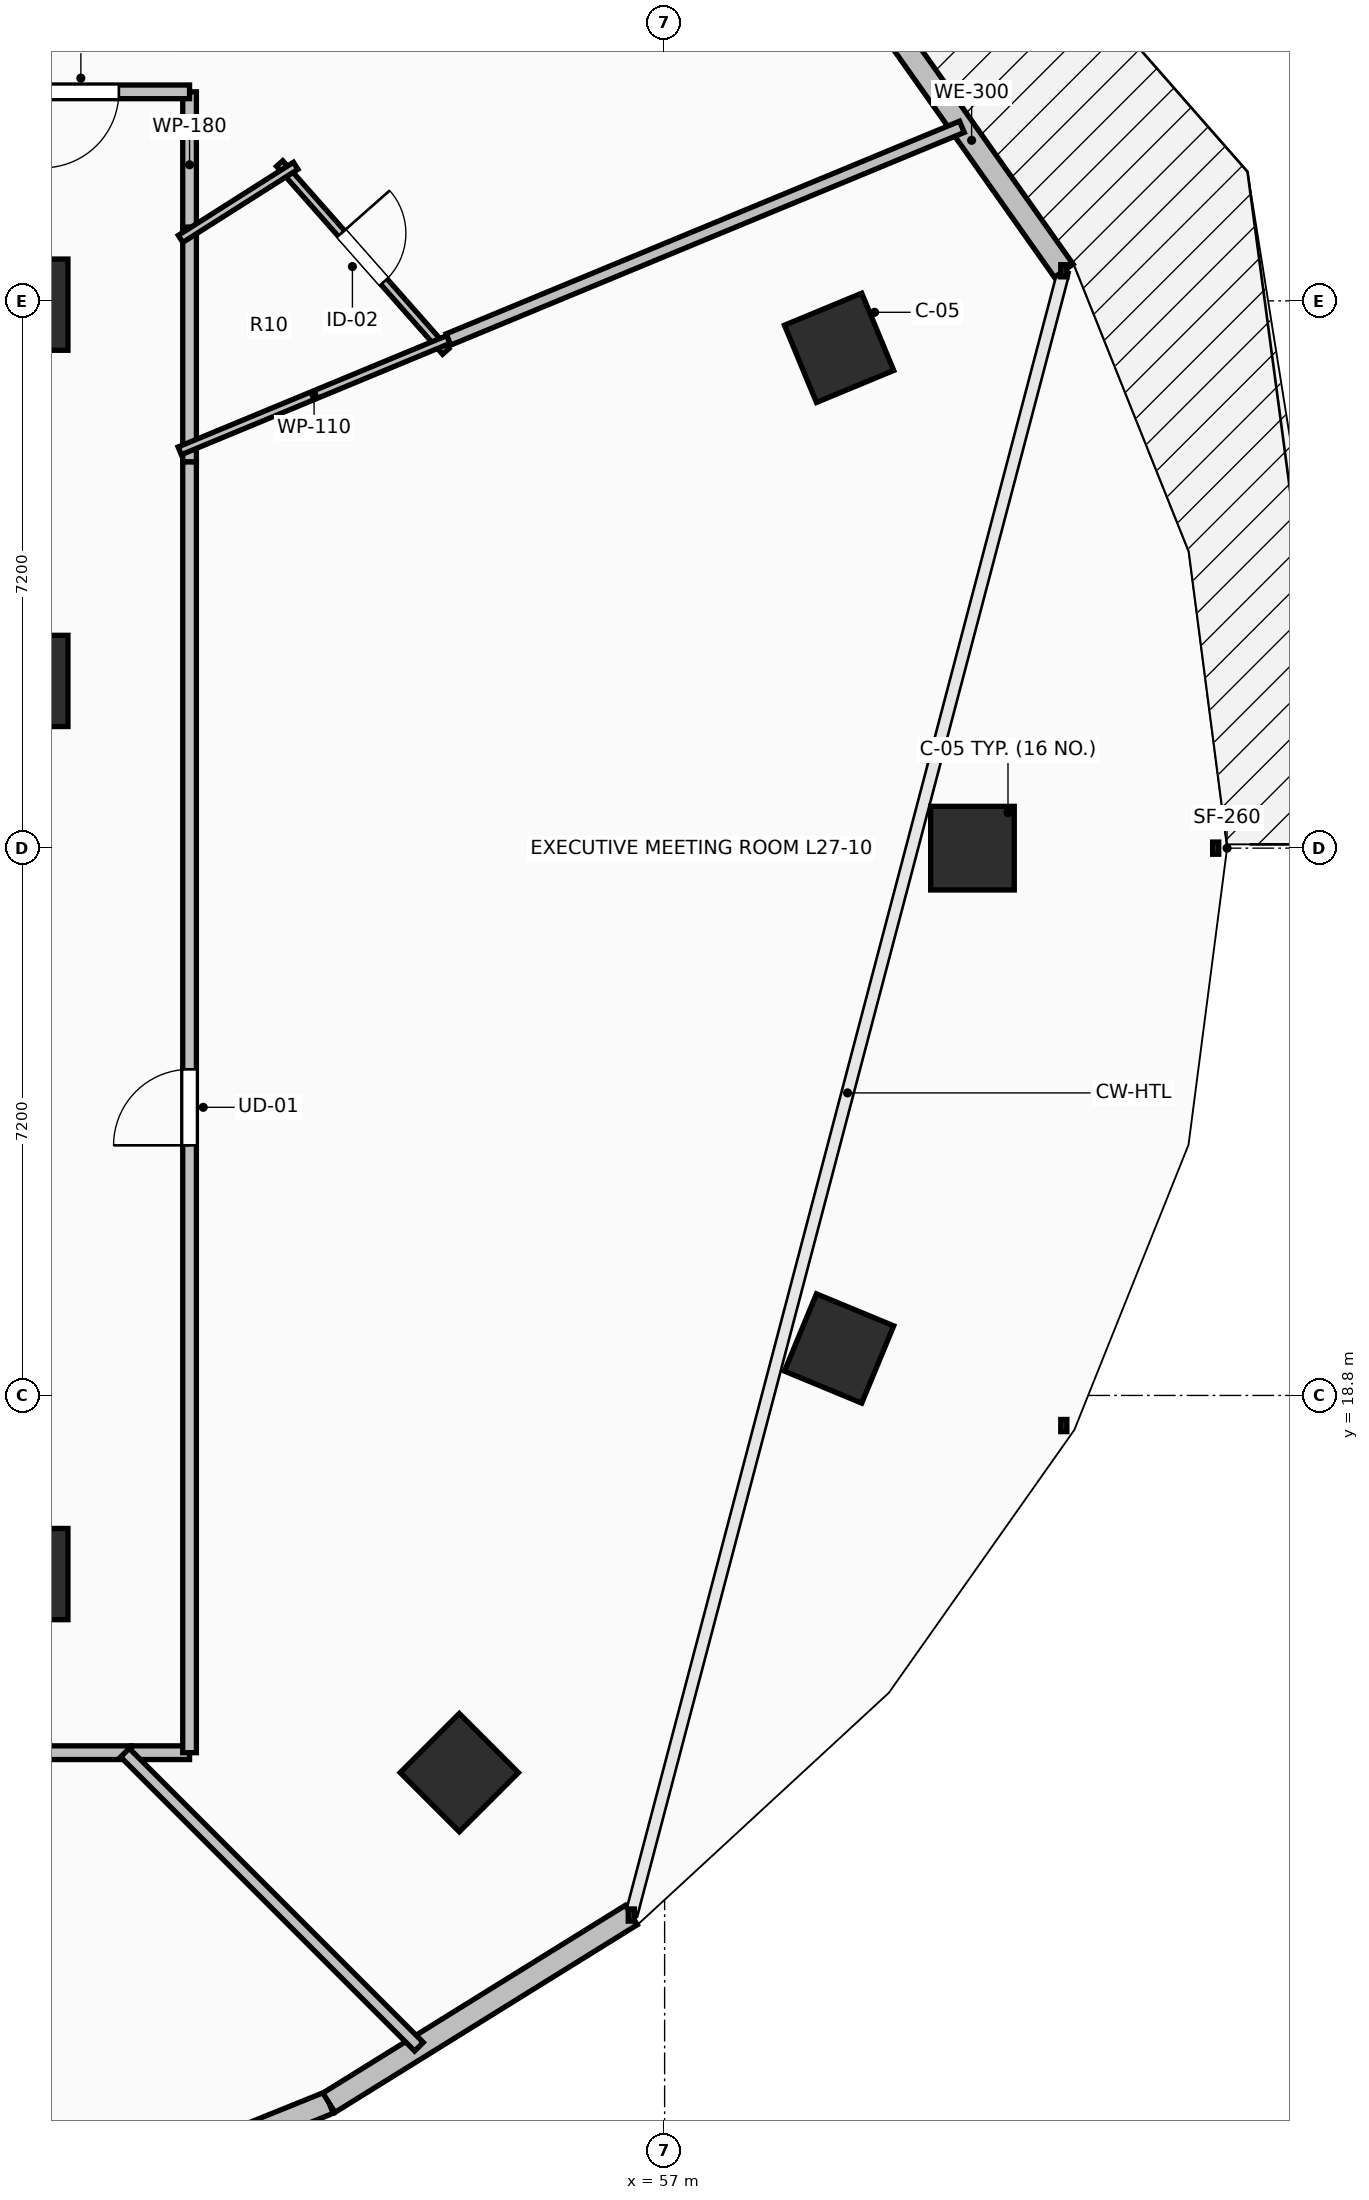
"""IFC4 building model, lengths in metres.
Left out: names, types, materials, properties, quantities, classifications, styles, units other than length and angle.
Written with IfcOpenShell. Run it as: python <this file> out.ifc"""

import sys

from ifc_helpers import new_model, si_unit, direction, frame, frame_2d, origin, origin_2d, place, context, subcontext, project, spatial, rectangle, extrude, element, fill, save


model = new_model("IFC4")
c1 = context("Model", 3, precision=1e-05, world=origin(), true_north=direction((0.0, 1.0)))
c2 = subcontext(c1, "Body", "Model", "MODEL_VIEW")
j1 = project(units=[si_unit("LENGTHUNIT", "METRE"), si_unit("PLANEANGLEUNIT", "RADIAN")], contexts=[c1])
p1 = place(None, origin())
s1 = spatial("IfcSite", under=j1, at=p1, CompositionType="ELEMENT")
p2 = place(p1, origin())
s2 = spatial("IfcBuilding", under=s1, at=p2, CompositionType="ELEMENT")
p3 = place(p2, frame((0.0, 0.0, 103.3)))
s3 = spatial("IfcBuildingStorey", under=s2, at=p3, CompositionType="ELEMENT", Elevation=103.3)
for number, where, z_axis, x_axis in (
    (1, (61.05, 26.0, 0.0), (0.0, 0.0, 1.0), (1.0, 0.0, 0.0)),
    (2, (59.295, 32.582, 0.0), (0.0, 0.0, 1.0), (0.924, 0.383, 0.0)),
    (3, (54.299, 13.838, 0.0), (0.0, 0.0, 1.0), (0.707, -0.707, 0.0)),
    (4, (59.295, 19.418, 0.0), (0.0, 0.0, 1.0), (0.924, -0.383, 0.0)),
):
    element("IfcColumn", number, at=place(p3, frame(where, z_axis=z_axis, x_axis=x_axis)), inside=s3, PredefinedType="COLUMN", context=c2, shape_type="SweptSolid", body=[
        extrude(rectangle(XDim=1.1, YDim=1.1, at=origin_2d()), origin(), (0.0, 0.0, 1.0), 3.5),
    ])
for number, where, z_axis, x_axis in (
    (5, (48.75, 33.15, 0.0), (0.0, 0.0, 1.0), (1.0, 0.0, 0.0)),
    (6, (48.75, 28.2, 0.0), (0.0, 0.0, 1.0), (1.0, 0.0, 0.0)),
    (7, (48.75, 16.45, 0.0), (0.0, 0.0, 1.0), (1.0, 0.0, 0.0)),
):
    element("IfcColumn", number, at=place(p3, frame(where, z_axis=z_axis, x_axis=x_axis)), inside=s3, PredefinedType="PILASTER", context=c2, shape_type="SweptSolid", body=[
        extrude(rectangle(XDim=0.8, YDim=1.2, at=origin_2d()), origin(), (0.0, 0.0, 1.0), 3.5),
    ])
p4 = place(p3, frame((62.252, 33.596, 0.0), z_axis=(0.0, 0.0, 1.0), x_axis=(-0.57716435238, 0.81662801222, 0.0)))
e8 = element("IfcWall", 8, at=p4, inside=s3, PredefinedType="STANDARD", context=c2, shape_type="SweptSolid", body=[
    extrude(rectangle(XDim=4.202, YDim=0.3, at=frame_2d((2.101, 0.0))), origin(), (0.0, 0.0, 1.0), 3.24),
])
p5 = place(p3, frame((48.045, 7.661, 0.0), z_axis=(0.0, 0.0, 1.0), x_axis=(0.927122233109, 0.374759075775, 0.0)))
e9 = element("IfcWall", 9, at=p5, inside=s3, PredefinedType="STANDARD", context=c2, shape_type="SweptSolid", body=[
    extrude(rectangle(XDim=4.895, YDim=0.3, at=frame_2d((2.448, 0.0))), origin(), (0.0, 0.0, 1.0), 3.24),
])
p6 = place(p3, frame((52.584, 9.495, 0.0), z_axis=(0.0, 0.0, 1.0), x_axis=(0.849684479743, 0.527291461038, 0.0)))
e10 = element("IfcWall", 10, at=p6, inside=s3, PredefinedType="STANDARD", context=c2, shape_type="SweptSolid", body=[
    extrude(rectangle(XDim=4.681, YDim=0.3, at=frame_2d((2.341, 0.0))), origin(), (0.0, 0.0, 1.0), 3.24),
])
p7 = place(p3, frame((50.75, 34.031, 0.0), z_axis=(0.0, 0.0, 1.0), x_axis=(0.0, 1.0, 0.0)))
e11 = element("IfcWall", 11, at=p7, inside=s3, PredefinedType="PARTITIONING", context=c2, shape_type="SweptSolid", body=[
    extrude(rectangle(XDim=1.919, YDim=0.18, at=frame_2d((0.959, 0.0))), origin(), (0.0, 0.0, 1.0), 2.432),
])
p8 = place(p3, frame((50.75, 35.95, 0.0), z_axis=(0.0, 0.0, 1.0), x_axis=(-1.0, 0.0, 0.0)))
e12 = element("IfcWall", 12, at=p8, inside=s3, PredefinedType="PARTITIONING", context=c2, shape_type="SweptSolid", body=[
    extrude(rectangle(XDim=2.86, YDim=0.18, at=frame_2d((1.43, 0.0))), origin(), (0.0, 0.0, 1.0), 2.432),
])
p9 = place(p8, frame((0.93, 0.0, 0.0)))
e13 = element("IfcOpeningElement", 13, at=p9, cuts=e12, PredefinedType="OPENING", context=c2, shape_type="SweptSolid", body=[
    extrude(rectangle(XDim=1.0, YDim=2.15, at=frame_2d((0.5, 1.075))), frame((0.0, 0.105, 0.0), z_axis=(0.0, -1.0, 0.0), x_axis=(1.0, 0.0, 0.0)), (0.0, 0.0, 1.0), 0.21),
])
p10 = place(p3, frame((50.75, 31.081, 0.0), z_axis=(0.0, 0.0, 1.0), x_axis=(0.0, 1.0, 0.0)))
e14 = element("IfcWall", 14, at=p10, inside=s3, PredefinedType="PARTITIONING", context=c2, shape_type="SweptSolid", body=[
    extrude(rectangle(XDim=3.09, YDim=0.18, at=frame_2d((1.545, 0.0))), origin(), (0.0, 0.0, 1.0), 2.432),
])
p11 = place(p3, frame((42.34, 14.1, 0.0), z_axis=(0.0, 0.0, 1.0), x_axis=(1.0, 0.0, 0.0)))
e15 = element("IfcWall", 15, at=p11, inside=s3, PredefinedType="PARTITIONING", context=c2, shape_type="SweptSolid", body=[
    extrude(rectangle(XDim=7.645, YDim=0.18, at=frame_2d((3.823, 0.0))), origin(), (0.0, 0.0, 1.0), 2.432),
])
p12 = place(p3, frame((49.985, 14.1, 0.0), z_axis=(0.0, 0.0, 1.0), x_axis=(1.0, 0.0, 0.0)))
e16 = element("IfcWall", 16, at=p12, inside=s3, PredefinedType="PARTITIONING", context=c2, shape_type="SweptSolid", body=[
    extrude(rectangle(XDim=0.765, YDim=0.18, at=frame_2d((0.382, 0.0))), origin(), (0.0, 0.0, 1.0), 2.972),
])
p13 = place(p3, frame((50.75, 14.1, 0.0), z_axis=(0.0, 0.0, 1.0), x_axis=(0.0, 1.0, 0.0)))
e17 = element("IfcWall", 17, at=p13, inside=s3, PredefinedType="PARTITIONING", context=c2, shape_type="SweptSolid", body=[
    extrude(rectangle(XDim=16.981, YDim=0.18, at=frame_2d((8.49, 0.0))), origin(), (0.0, 0.0, 1.0), 2.432),
])
p14 = place(p13, frame((7.99, 0.0, 0.0)))
e18 = element("IfcOpeningElement", 18, at=p14, cuts=e17, PredefinedType="OPENING", context=c2, shape_type="SweptSolid", body=[
    extrude(rectangle(XDim=1.0, YDim=2.15, at=frame_2d((0.5, 1.075))), frame((0.0, 0.105, 0.0), z_axis=(0.0, -1.0, 0.0), x_axis=(1.0, 0.0, 0.0)), (0.0, 0.0, 1.0), 0.21),
])
p15 = place(p3, frame((51.935, 35.007, 0.0), z_axis=(0.0, 0.0, 1.0), x_axis=(0.662059609276, -0.749451181709, 0.0)))
e19 = element("IfcWall", 19, at=p15, inside=s3, PredefinedType="PARTITIONING", context=c2, shape_type="SweptSolid", body=[
    extrude(rectangle(XDim=3.299, YDim=0.11, at=frame_2d((1.65, 0.0))), origin(), (0.0, 0.0, 1.0), 2.432),
])
p16 = place(p15, frame((1.225, 0.0, 0.0)))
e20 = element("IfcOpeningElement", 20, at=p16, cuts=e19, PredefinedType="OPENING", context=c2, shape_type="SweptSolid", body=[
    extrude(rectangle(XDim=0.85, YDim=2.1, at=frame_2d((0.425, 1.05))), frame((0.0, 0.07, 0.0), z_axis=(0.0, -1.0, 0.0), x_axis=(1.0, 0.0, 0.0)), (0.0, 0.0, 1.0), 0.14),
])
p17 = place(p3, frame((54.156, 32.693, 0.0), z_axis=(0.0, 0.0, 1.0), x_axis=(-0.923803754276, -0.382866326002, 0.0)))
e21 = element("IfcWall", 21, at=p17, inside=s3, PredefinedType="PARTITIONING", context=c2, shape_type="SweptSolid", body=[
    extrude(rectangle(XDim=3.827, YDim=0.11, at=frame_2d((1.914, 0.0))), origin(), (0.0, 0.0, 1.0), 2.432),
])
p18 = place(p3, frame((50.632, 34.016, 0.0), z_axis=(0.0, 0.0, 1.0), x_axis=(0.844361394482, 0.535774052665, 0.0)))
e22 = element("IfcWall", 22, at=p18, inside=s3, PredefinedType="PARTITIONING", context=c2, shape_type="SweptSolid", body=[
    extrude(rectangle(XDim=1.793, YDim=0.11, at=frame_2d((0.897, 0.0))), origin(), (0.0, 0.0, 1.0), 2.886),
])
p19 = place(p3, frame((49.053, 37.053, 0.0), z_axis=(0.0, 0.0, 1.0), x_axis=(-0.707106781187, -0.707106781187, 0.0)))
e23 = element("IfcWall", 23, at=p19, inside=s3, PredefinedType="PARTITIONING", context=c2, shape_type="SweptSolid", body=[
    extrude(rectangle(XDim=1.7, YDim=0.16, at=frame_2d((0.85, 0.0))), origin(), (0.0, 0.0, 1.0), 2.432),
])
p20 = place(p3, frame((54.156, 32.692, 0.0), z_axis=(0.0, 0.0, 1.0), x_axis=(0.923875192571, 0.38269390974, 0.0)))
e24 = element("IfcWall", 24, at=p20, inside=s3, PredefinedType="PARTITIONING", context=c2, shape_type="SweptSolid", body=[
    extrude(rectangle(XDim=7.311, YDim=0.16, at=frame_2d((3.656, 0.0))), origin(), (0.0, 0.0, 1.0), 2.432),
])
p21 = place(p3, frame((53.768, 10.232, 0.0), z_axis=(0.0, 0.0, 1.0), x_axis=(-0.707106781187, 0.707106781187, 0.0)))
e25 = element("IfcWall", 25, at=p21, inside=s3, PredefinedType="PARTITIONING", context=c2, shape_type="SweptSolid", body=[
    extrude(rectangle(XDim=5.47, YDim=0.16, at=frame_2d((2.735, 0.0))), origin(), (0.0, 0.0, 1.0), 2.677),
])
p22 = place(p9, origin())
e26 = element("IfcDoor", 26, at=p22, inside=s3, OperationType="SINGLE_SWING_RIGHT", PredefinedType="DOOR", context=c2, shape_type="SweptSolid", body=[
    extrude(rectangle(XDim=1.0, YDim=2.15, at=frame_2d((0.5, 1.075))), frame((0.0, 0.025, 0.0), z_axis=(0.0, -1.0, 0.0), x_axis=(1.0, 0.0, 0.0)), (0.0, 0.0, 1.0), 0.05),
])
fill(e13, e26)
p23 = place(p14, origin())
e27 = element("IfcDoor", 27, at=p23, inside=s3, OperationType="SINGLE_SWING_LEFT", PredefinedType="DOOR", context=c2, shape_type="SweptSolid", body=[
    extrude(rectangle(XDim=1.0, YDim=2.15, at=frame_2d((0.5, 1.075))), frame((0.0, 0.025, 0.0), z_axis=(0.0, -1.0, 0.0), x_axis=(1.0, 0.0, 0.0)), (0.0, 0.0, 1.0), 0.05),
])
fill(e18, e27)
p24 = place(p16, origin())
e28 = element("IfcDoor", 28, at=p24, inside=s3, OperationType="SINGLE_SWING_LEFT", PredefinedType="DOOR", context=c2, shape_type="SweptSolid", body=[
    extrude(rectangle(XDim=0.85, YDim=2.1, at=frame_2d((0.425, 1.05))), frame((0.0, 0.025, 0.0), z_axis=(0.0, -1.0, 0.0), x_axis=(1.0, 0.0, 0.0)), (0.0, 0.0, 1.0), 0.05),
])
fill(e20, e28)
save(model, sys.argv[1])
